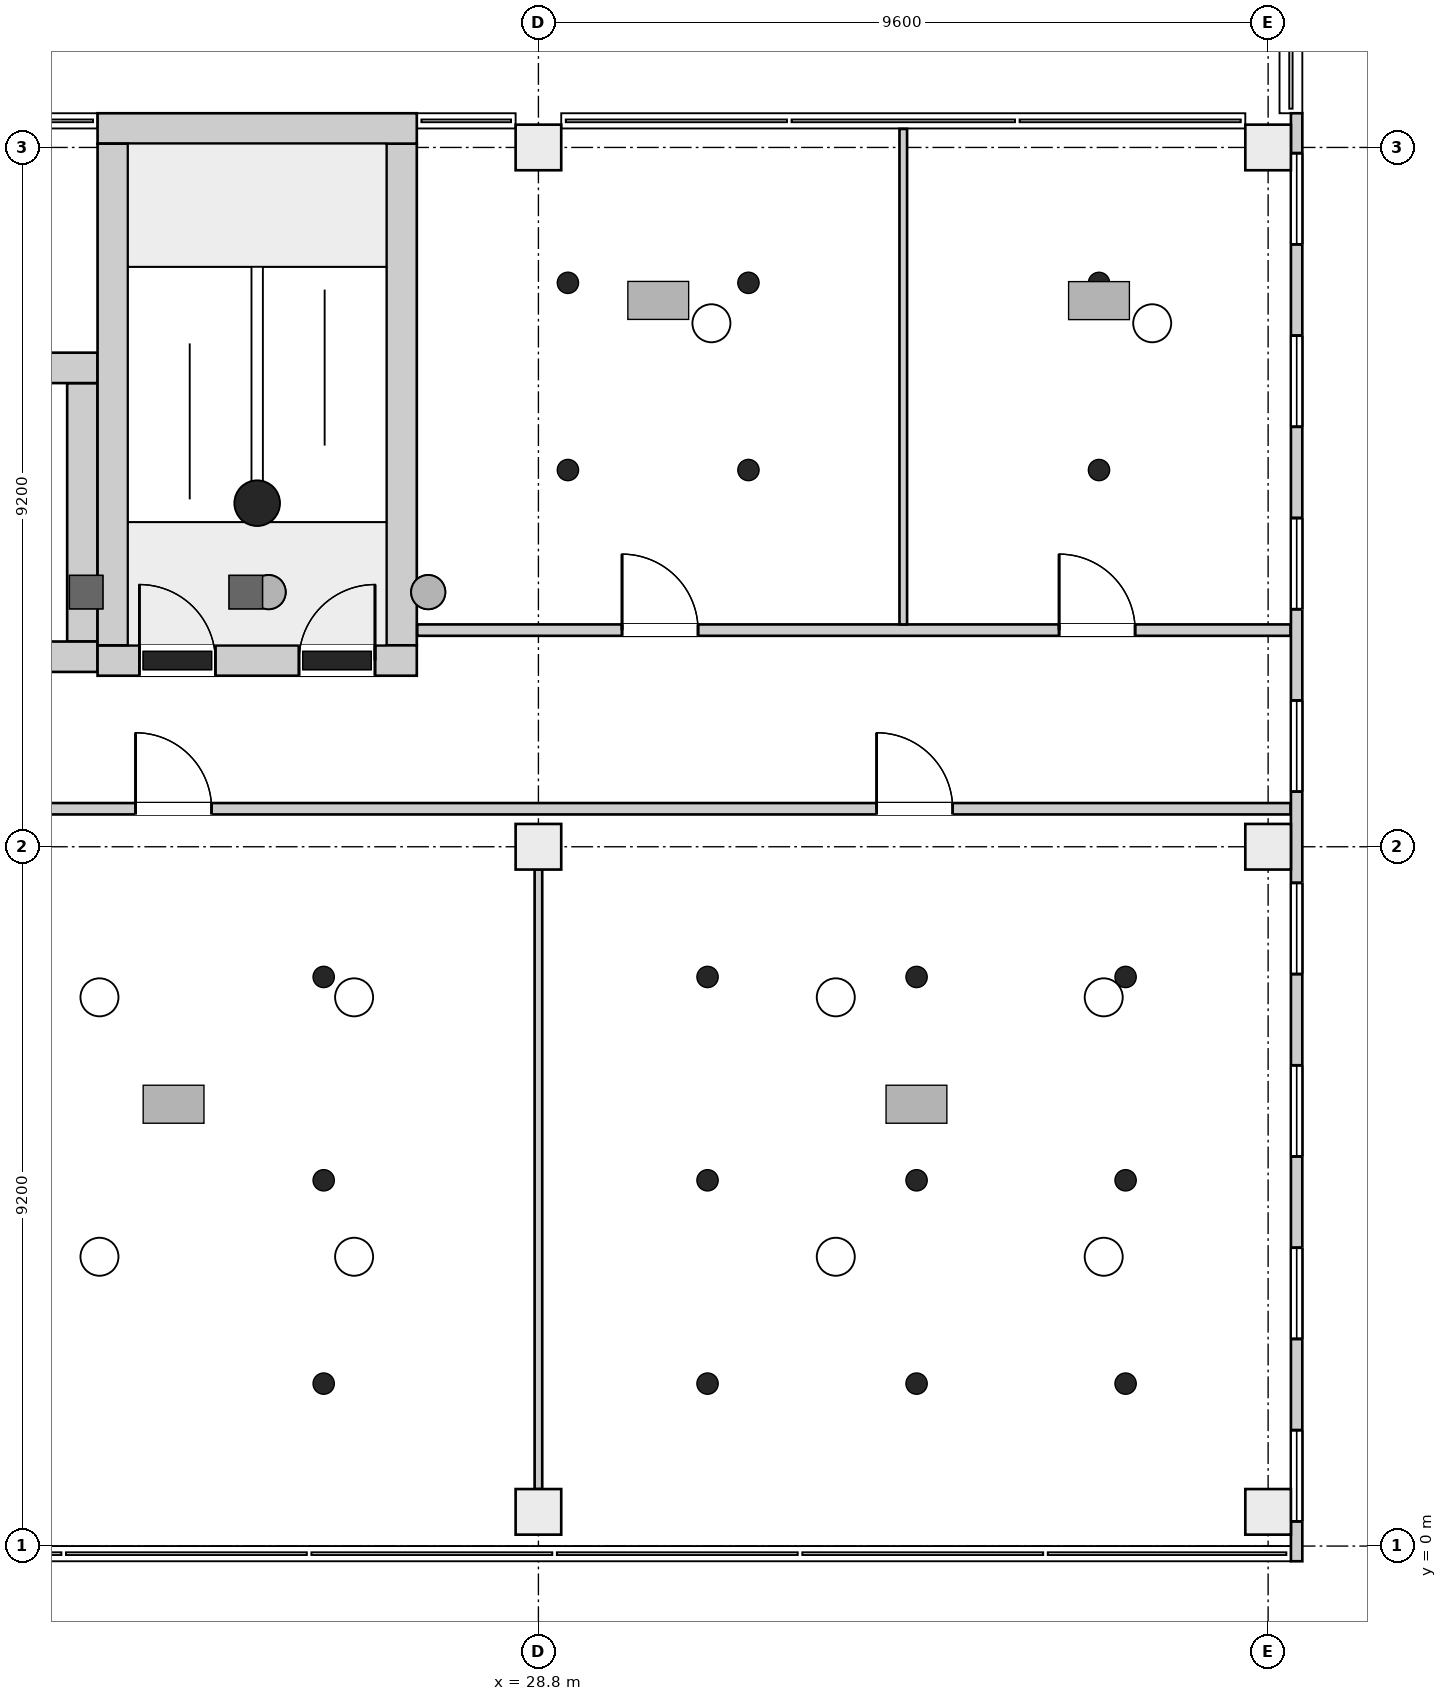
"""IFC4 building model, lengths in metres.
Left out: names, types, materials, properties, quantities, classifications, styles, units other than length and angle.
Written with IfcOpenShell. Run it as: python <this file> out.ifc"""

import sys

from ifc_helpers import new_model, si_unit, direction, frame, frame_2d, origin, origin_2d, place, context, subcontext, project, spatial, rectangle, extrude, element, fill, save


model = new_model("IFC4")
c1 = context("Model", 3, precision=1e-05, world=origin(), true_north=direction((0.0, 1.0)))
c2 = subcontext(c1, "Body", "Model", "MODEL_VIEW")
j1 = project(units=[si_unit("LENGTHUNIT", "METRE"), si_unit("PLANEANGLEUNIT", "RADIAN")], contexts=[c1])
p1 = place(None, origin())
s1 = spatial("IfcSite", under=j1, at=p1, CompositionType="ELEMENT")
p2 = place(p1, origin())
s2 = spatial("IfcBuilding", under=s1, at=p2, CompositionType="ELEMENT")
p3 = place(p2, frame((0.0, 0.0, 73.9)))
s3 = spatial("IfcBuildingStorey", under=s2, at=p3, CompositionType="ELEMENT", Elevation=73.9)
p4 = place(p3, frame((23.0, 11.65, 0.0), z_axis=(0.0, 0.0, 1.0), x_axis=(1.0, 0.0, 0.0)))
e1 = element("IfcWall", 1, at=p4, inside=s3, PredefinedType="SHEAR", context=c2, shape_type="SweptSolid", body=[
    extrude(rectangle(XDim=4.2, YDim=0.4, at=frame_2d((2.1, 0.0))), origin(), (0.0, 0.0, 1.0), 4.2),
])
p5 = place(p4, frame((0.55, 0.0, 0.0)))
e2 = element("IfcOpeningElement", 2, at=p5, cuts=e1, PredefinedType="OPENING", context=c2, shape_type="SweptSolid", body=[
    extrude(rectangle(XDim=1.0, YDim=2.1, at=frame_2d((0.5, 1.05))), frame((0.0, 0.21, 0.0), z_axis=(0.0, -1.0, 0.0), x_axis=(1.0, 0.0, 0.0)), (0.0, 0.0, 1.0), 0.42),
])
p6 = place(p4, frame((2.65, 0.0, 0.0)))
e3 = element("IfcOpeningElement", 3, at=p6, cuts=e1, PredefinedType="OPENING", context=c2, shape_type="SweptSolid", body=[
    extrude(rectangle(XDim=1.0, YDim=2.1, at=frame_2d((0.5, 1.05))), frame((0.0, 0.21, 0.0), z_axis=(0.0, -1.0, 0.0), x_axis=(1.0, 0.0, 0.0)), (0.0, 0.0, 1.0), 0.42),
])
p7 = place(p3, frame((23.0, 18.65, 0.0), z_axis=(0.0, 0.0, 1.0), x_axis=(1.0, 0.0, 0.0)))
e4 = element("IfcWall", 4, at=p7, inside=s3, PredefinedType="SHEAR", context=c2, shape_type="SweptSolid", body=[
    extrude(rectangle(XDim=4.2, YDim=0.4, at=frame_2d((2.1, 0.0))), origin(), (0.0, 0.0, 1.0), 4.2),
])
for number, where, z_axis, x_axis in (
    (5, (23.2, 11.85, 0.0), (0.0, 0.0, 1.0), (0.0, 1.0, 0.0)),
    (6, (27.0, 11.85, 0.0), (0.0, 0.0, 1.0), (0.0, 1.0, 0.0)),
):
    element("IfcWall", number, at=place(p3, frame(where, z_axis=z_axis, x_axis=x_axis)), inside=s3, PredefinedType="SHEAR", context=c2, shape_type="SweptSolid", body=[
        extrude(rectangle(XDim=6.6, YDim=0.4, at=frame_2d((3.3, 0.0))), origin(), (0.0, 0.0, 1.0), 4.2),
    ])
p8 = place(p3, frame((19.9, 11.7, 0.0), z_axis=(0.0, 0.0, 1.0), x_axis=(1.0, 0.0, 0.0)))
e7 = element("IfcWall", 7, at=p8, inside=s3, PredefinedType="SHEAR", context=c2, shape_type="SweptSolid", body=[
    extrude(rectangle(XDim=3.1, YDim=0.4, at=frame_2d((1.55, 0.0))), origin(), (0.0, 0.0, 1.0), 4.2),
])
p9 = place(p3, frame((19.9, 15.5, 0.0), z_axis=(0.0, 0.0, 1.0), x_axis=(1.0, 0.0, 0.0)))
e8 = element("IfcWall", 8, at=p9, inside=s3, PredefinedType="SHEAR", context=c2, shape_type="SweptSolid", body=[
    extrude(rectangle(XDim=3.1, YDim=0.4, at=frame_2d((1.55, 0.0))), origin(), (0.0, 0.0, 1.0), 4.2),
])
p10 = place(p9, frame((0.95, 0.0, 0.0)))
e9 = element("IfcOpeningElement", 9, at=p10, cuts=e8, PredefinedType="OPENING", context=c2, shape_type="SweptSolid", body=[
    extrude(rectangle(XDim=1.2, YDim=2.1, at=frame_2d((0.6, 1.05))), frame((0.0, 0.21, 0.0), z_axis=(0.0, -1.0, 0.0), x_axis=(1.0, 0.0, 0.0)), (0.0, 0.0, 1.0), 0.42),
])
p11 = place(p3, frame((22.8, 11.9, 0.0), z_axis=(0.0, 0.0, 1.0), x_axis=(0.0, 1.0, 0.0)))
e10 = element("IfcWall", 10, at=p11, inside=s3, PredefinedType="SHEAR", context=c2, shape_type="SweptSolid", body=[
    extrude(rectangle(XDim=3.4, YDim=0.4, at=frame_2d((1.7, 0.0))), origin(), (0.0, 0.0, 1.0), 4.2),
])
for number, where, z_axis, x_axis in (
    (11, (28.8, 0.45, 0.0), (0.0, 0.0, 1.0), (1.0, 0.0, 0.0)),
    (12, (38.4, 0.45, 0.0), (0.0, 0.0, 1.0), (1.0, 0.0, 0.0)),
    (13, (28.8, 9.2, 0.0), (0.0, 0.0, 1.0), (1.0, 0.0, 0.0)),
    (14, (38.4, 9.2, 0.0), (0.0, 0.0, 1.0), (1.0, 0.0, 0.0)),
    (15, (28.8, 18.4, 0.0), (0.0, 0.0, 1.0), (1.0, 0.0, 0.0)),
    (16, (38.4, 18.4, 0.0), (0.0, 0.0, 1.0), (1.0, 0.0, 0.0)),
):
    element("IfcColumn", number, at=place(p3, frame(where, z_axis=z_axis, x_axis=x_axis)), inside=s3, PredefinedType="COLUMN", context=c2, shape_type="SweptSolid", body=[
        extrude(rectangle(XDim=0.6, YDim=0.6, at=origin_2d()), origin(), (0.0, 0.0, 1.0), 4.2),
    ])
p12 = place(p3, frame((38.775, -0.2, 0.0), z_axis=(0.0, 0.0, 1.0), x_axis=(0.0, 1.0, 0.0)))
e17 = element("IfcWall", 17, at=p12, inside=s3, PredefinedType="ELEMENTEDWALL", context=c2, shape_type="SweptSolid", body=[
    extrude(rectangle(XDim=19.05, YDim=0.15, at=frame_2d((9.525, 0.0))), origin(), (0.0, 0.0, 1.0), 3.9),
])
p13 = place(p12, frame((0.525, 0.0, 0.9)))
e18 = element("IfcOpeningElement", 18, at=p13, cuts=e17, PredefinedType="OPENING", context=c2, shape_type="SweptSolid", body=[
    extrude(rectangle(XDim=1.2, YDim=2.6, at=frame_2d((0.6, 1.3))), frame((0.0, 0.085, 0.0), z_axis=(0.0, -1.0, 0.0), x_axis=(1.0, 0.0, 0.0)), (0.0, 0.0, 1.0), 0.17),
])
p14 = place(p12, frame((2.925, 0.0, 0.9)))
e19 = element("IfcOpeningElement", 19, at=p14, cuts=e17, PredefinedType="OPENING", context=c2, shape_type="SweptSolid", body=[
    extrude(rectangle(XDim=1.2, YDim=2.6, at=frame_2d((0.6, 1.3))), frame((0.0, 0.085, 0.0), z_axis=(0.0, -1.0, 0.0), x_axis=(1.0, 0.0, 0.0)), (0.0, 0.0, 1.0), 0.17),
])
p15 = place(p12, frame((5.325, 0.0, 0.9)))
e20 = element("IfcOpeningElement", 20, at=p15, cuts=e17, PredefinedType="OPENING", context=c2, shape_type="SweptSolid", body=[
    extrude(rectangle(XDim=1.2, YDim=2.6, at=frame_2d((0.6, 1.3))), frame((0.0, 0.085, 0.0), z_axis=(0.0, -1.0, 0.0), x_axis=(1.0, 0.0, 0.0)), (0.0, 0.0, 1.0), 0.17),
])
p16 = place(p12, frame((7.725, 0.0, 0.9)))
e21 = element("IfcOpeningElement", 21, at=p16, cuts=e17, PredefinedType="OPENING", context=c2, shape_type="SweptSolid", body=[
    extrude(rectangle(XDim=1.2, YDim=2.6, at=frame_2d((0.6, 1.3))), frame((0.0, 0.085, 0.0), z_axis=(0.0, -1.0, 0.0), x_axis=(1.0, 0.0, 0.0)), (0.0, 0.0, 1.0), 0.17),
])
p17 = place(p12, frame((10.125, 0.0, 0.9)))
e22 = element("IfcOpeningElement", 22, at=p17, cuts=e17, PredefinedType="OPENING", context=c2, shape_type="SweptSolid", body=[
    extrude(rectangle(XDim=1.2, YDim=2.6, at=frame_2d((0.6, 1.3))), frame((0.0, 0.085, 0.0), z_axis=(0.0, -1.0, 0.0), x_axis=(1.0, 0.0, 0.0)), (0.0, 0.0, 1.0), 0.17),
])
p18 = place(p12, frame((12.525, 0.0, 0.9)))
e23 = element("IfcOpeningElement", 23, at=p18, cuts=e17, PredefinedType="OPENING", context=c2, shape_type="SweptSolid", body=[
    extrude(rectangle(XDim=1.2, YDim=2.6, at=frame_2d((0.6, 1.3))), frame((0.0, 0.085, 0.0), z_axis=(0.0, -1.0, 0.0), x_axis=(1.0, 0.0, 0.0)), (0.0, 0.0, 1.0), 0.17),
])
p19 = place(p12, frame((14.925, 0.0, 0.9)))
e24 = element("IfcOpeningElement", 24, at=p19, cuts=e17, PredefinedType="OPENING", context=c2, shape_type="SweptSolid", body=[
    extrude(rectangle(XDim=1.2, YDim=2.6, at=frame_2d((0.6, 1.3))), frame((0.0, 0.085, 0.0), z_axis=(0.0, -1.0, 0.0), x_axis=(1.0, 0.0, 0.0)), (0.0, 0.0, 1.0), 0.17),
])
p20 = place(p12, frame((17.325, 0.0, 0.9)))
e25 = element("IfcOpeningElement", 25, at=p20, cuts=e17, PredefinedType="OPENING", context=c2, shape_type="SweptSolid", body=[
    extrude(rectangle(XDim=1.2, YDim=2.6, at=frame_2d((0.6, 1.3))), frame((0.0, 0.085, 0.0), z_axis=(0.0, -1.0, 0.0), x_axis=(1.0, 0.0, 0.0)), (0.0, 0.0, 1.0), 0.17),
])
p21 = place(p3, frame((4.325, 9.7, 0.0), z_axis=(0.0, 0.0, 1.0), x_axis=(1.0, 0.0, 0.0)))
e26 = element("IfcWall", 26, at=p21, inside=s3, PredefinedType="PARTITIONING", context=c2, shape_type="SweptSolid", body=[
    extrude(rectangle(XDim=34.369, YDim=0.15, at=frame_2d((17.185, 0.0))), origin(), (0.0, 0.0, 1.0), 3.9),
])
p22 = place(p21, frame((3.975, 0.0, 0.0)))
e27 = element("IfcOpeningElement", 27, at=p22, cuts=e26, PredefinedType="OPENING", context=c2, shape_type="SweptSolid", body=[
    extrude(rectangle(XDim=1.0, YDim=2.1, at=frame_2d((0.5, 1.05))), frame((0.0, 0.085, 0.0), z_axis=(0.0, -1.0, 0.0), x_axis=(1.0, 0.0, 0.0)), (0.0, 0.0, 1.0), 0.17),
])
p23 = place(p21, frame((11.975, 0.0, 0.0)))
e28 = element("IfcOpeningElement", 28, at=p23, cuts=e26, PredefinedType="OPENING", context=c2, shape_type="SweptSolid", body=[
    extrude(rectangle(XDim=1.0, YDim=2.1, at=frame_2d((0.5, 1.05))), frame((0.0, 0.085, 0.0), z_axis=(0.0, -1.0, 0.0), x_axis=(1.0, 0.0, 0.0)), (0.0, 0.0, 1.0), 0.17),
])
p24 = place(p21, frame((19.175, 0.0, 0.0)))
e29 = element("IfcOpeningElement", 29, at=p24, cuts=e26, PredefinedType="OPENING", context=c2, shape_type="SweptSolid", body=[
    extrude(rectangle(XDim=1.0, YDim=2.1, at=frame_2d((0.5, 1.05))), frame((0.0, 0.085, 0.0), z_axis=(0.0, -1.0, 0.0), x_axis=(1.0, 0.0, 0.0)), (0.0, 0.0, 1.0), 0.17),
])
p25 = place(p21, frame((28.925, 0.0, 0.0)))
e30 = element("IfcOpeningElement", 30, at=p25, cuts=e26, PredefinedType="OPENING", context=c2, shape_type="SweptSolid", body=[
    extrude(rectangle(XDim=1.0, YDim=2.1, at=frame_2d((0.5, 1.05))), frame((0.0, 0.085, 0.0), z_axis=(0.0, -1.0, 0.0), x_axis=(1.0, 0.0, 0.0)), (0.0, 0.0, 1.0), 0.17),
])
p26 = place(p3, frame((27.206, 12.05, 0.0), z_axis=(0.0, 0.0, 1.0), x_axis=(1.0, 0.0, 0.0)))
e31 = element("IfcWall", 31, at=p26, inside=s3, PredefinedType="PARTITIONING", context=c2, shape_type="SweptSolid", body=[
    extrude(rectangle(XDim=11.488, YDim=0.15, at=frame_2d((5.744, 0.0))), origin(), (0.0, 0.0, 1.0), 3.9),
])
p27 = place(p26, frame((2.694, 0.0, 0.0)))
e32 = element("IfcOpeningElement", 32, at=p27, cuts=e31, PredefinedType="OPENING", context=c2, shape_type="SweptSolid", body=[
    extrude(rectangle(XDim=1.0, YDim=2.1, at=frame_2d((0.5, 1.05))), frame((0.0, 0.085, 0.0), z_axis=(0.0, -1.0, 0.0), x_axis=(1.0, 0.0, 0.0)), (0.0, 0.0, 1.0), 0.17),
])
p28 = place(p26, frame((8.444, 0.0, 0.0)))
e33 = element("IfcOpeningElement", 33, at=p28, cuts=e31, PredefinedType="OPENING", context=c2, shape_type="SweptSolid", body=[
    extrude(rectangle(XDim=1.0, YDim=2.1, at=frame_2d((0.5, 1.05))), frame((0.0, 0.085, 0.0), z_axis=(0.0, -1.0, 0.0), x_axis=(1.0, 0.0, 0.0)), (0.0, 0.0, 1.0), 0.17),
])
p29 = place(p3, frame((28.8, 0.75, 0.0), z_axis=(0.0, 0.0, 1.0), x_axis=(0.0, 1.0, 0.0)))
e34 = element("IfcWall", 34, at=p29, inside=s3, PredefinedType="PARTITIONING", context=c2, shape_type="SweptSolid", body=[
    extrude(rectangle(XDim=8.15, YDim=0.1, at=frame_2d((4.075, 0.0))), origin(), (0.0, 0.0, 1.0), 3.9),
])
p30 = place(p3, frame((33.6, 12.125, 0.0), z_axis=(0.0, 0.0, 1.0), x_axis=(0.0, 1.0, 0.0)))
e35 = element("IfcWall", 35, at=p30, inside=s3, PredefinedType="PARTITIONING", context=c2, shape_type="SweptSolid", body=[
    extrude(rectangle(XDim=6.519, YDim=0.1, at=frame_2d((3.26, 0.0))), origin(), (0.0, 0.0, 1.0), 3.9),
])
p31 = place(p13, origin())
e36 = element("IfcWindow", 36, at=p31, inside=s3, PartitioningType="SINGLE_PANEL", PredefinedType="WINDOW", context=c2, shape_type="SweptSolid", body=[
    extrude(rectangle(XDim=1.2, YDim=2.6, at=frame_2d((0.6, 1.3))), frame((0.0, 0.03, 0.0), z_axis=(0.0, -1.0, 0.0), x_axis=(1.0, 0.0, 0.0)), (0.0, 0.0, 1.0), 0.06),
])
fill(e18, e36)
p32 = place(p14, origin())
e37 = element("IfcWindow", 37, at=p32, inside=s3, PartitioningType="SINGLE_PANEL", PredefinedType="WINDOW", context=c2, shape_type="SweptSolid", body=[
    extrude(rectangle(XDim=1.2, YDim=2.6, at=frame_2d((0.6, 1.3))), frame((0.0, 0.03, 0.0), z_axis=(0.0, -1.0, 0.0), x_axis=(1.0, 0.0, 0.0)), (0.0, 0.0, 1.0), 0.06),
])
fill(e19, e37)
p33 = place(p15, origin())
e38 = element("IfcWindow", 38, at=p33, inside=s3, PartitioningType="SINGLE_PANEL", PredefinedType="WINDOW", context=c2, shape_type="SweptSolid", body=[
    extrude(rectangle(XDim=1.2, YDim=2.6, at=frame_2d((0.6, 1.3))), frame((0.0, 0.03, 0.0), z_axis=(0.0, -1.0, 0.0), x_axis=(1.0, 0.0, 0.0)), (0.0, 0.0, 1.0), 0.06),
])
fill(e20, e38)
p34 = place(p16, origin())
e39 = element("IfcWindow", 39, at=p34, inside=s3, PartitioningType="SINGLE_PANEL", PredefinedType="WINDOW", context=c2, shape_type="SweptSolid", body=[
    extrude(rectangle(XDim=1.2, YDim=2.6, at=frame_2d((0.6, 1.3))), frame((0.0, 0.03, 0.0), z_axis=(0.0, -1.0, 0.0), x_axis=(1.0, 0.0, 0.0)), (0.0, 0.0, 1.0), 0.06),
])
fill(e21, e39)
p35 = place(p17, origin())
e40 = element("IfcWindow", 40, at=p35, inside=s3, PartitioningType="SINGLE_PANEL", PredefinedType="WINDOW", context=c2, shape_type="SweptSolid", body=[
    extrude(rectangle(XDim=1.2, YDim=2.6, at=frame_2d((0.6, 1.3))), frame((0.0, 0.03, 0.0), z_axis=(0.0, -1.0, 0.0), x_axis=(1.0, 0.0, 0.0)), (0.0, 0.0, 1.0), 0.06),
])
fill(e22, e40)
p36 = place(p18, origin())
e41 = element("IfcWindow", 41, at=p36, inside=s3, PartitioningType="SINGLE_PANEL", PredefinedType="WINDOW", context=c2, shape_type="SweptSolid", body=[
    extrude(rectangle(XDim=1.2, YDim=2.6, at=frame_2d((0.6, 1.3))), frame((0.0, 0.03, 0.0), z_axis=(0.0, -1.0, 0.0), x_axis=(1.0, 0.0, 0.0)), (0.0, 0.0, 1.0), 0.06),
])
fill(e23, e41)
p37 = place(p19, origin())
e42 = element("IfcWindow", 42, at=p37, inside=s3, PartitioningType="SINGLE_PANEL", PredefinedType="WINDOW", context=c2, shape_type="SweptSolid", body=[
    extrude(rectangle(XDim=1.2, YDim=2.6, at=frame_2d((0.6, 1.3))), frame((0.0, 0.03, 0.0), z_axis=(0.0, -1.0, 0.0), x_axis=(1.0, 0.0, 0.0)), (0.0, 0.0, 1.0), 0.06),
])
fill(e24, e42)
p38 = place(p20, origin())
e43 = element("IfcWindow", 43, at=p38, inside=s3, PartitioningType="SINGLE_PANEL", PredefinedType="WINDOW", context=c2, shape_type="SweptSolid", body=[
    extrude(rectangle(XDim=1.2, YDim=2.6, at=frame_2d((0.6, 1.3))), frame((0.0, 0.03, 0.0), z_axis=(0.0, -1.0, 0.0), x_axis=(1.0, 0.0, 0.0)), (0.0, 0.0, 1.0), 0.06),
])
fill(e25, e43)
p39 = place(p5, origin())
e44 = element("IfcDoor", 44, at=p39, inside=s3, OperationType="SINGLE_SWING_RIGHT", PredefinedType="DOOR", context=c2, shape_type="SweptSolid", body=[
    extrude(rectangle(XDim=1.0, YDim=2.1, at=frame_2d((0.5, 1.05))), frame((0.0, 0.025, 0.0), z_axis=(0.0, -1.0, 0.0), x_axis=(1.0, 0.0, 0.0)), (0.0, 0.0, 1.0), 0.05),
])
fill(e2, e44)
p40 = place(p6, origin())
e45 = element("IfcDoor", 45, at=p40, inside=s3, OperationType="SINGLE_SWING_LEFT", PredefinedType="DOOR", context=c2, shape_type="SweptSolid", body=[
    extrude(rectangle(XDim=1.0, YDim=2.1, at=frame_2d((0.5, 1.05))), frame((0.0, 0.025, 0.0), z_axis=(0.0, -1.0, 0.0), x_axis=(1.0, 0.0, 0.0)), (0.0, 0.0, 1.0), 0.05),
])
fill(e3, e45)
p41 = place(p24, origin())
e46 = element("IfcDoor", 46, at=p41, inside=s3, OperationType="SINGLE_SWING_LEFT", PredefinedType="DOOR", context=c2, shape_type="SweptSolid", body=[
    extrude(rectangle(XDim=1.0, YDim=2.1, at=frame_2d((0.5, 1.05))), frame((0.0, 0.025, 0.0), z_axis=(0.0, -1.0, 0.0), x_axis=(1.0, 0.0, 0.0)), (0.0, 0.0, 1.0), 0.05),
])
fill(e29, e46)
p42 = place(p25, origin())
e47 = element("IfcDoor", 47, at=p42, inside=s3, OperationType="SINGLE_SWING_LEFT", PredefinedType="DOOR", context=c2, shape_type="SweptSolid", body=[
    extrude(rectangle(XDim=1.0, YDim=2.1, at=frame_2d((0.5, 1.05))), frame((0.0, 0.025, 0.0), z_axis=(0.0, -1.0, 0.0), x_axis=(1.0, 0.0, 0.0)), (0.0, 0.0, 1.0), 0.05),
])
fill(e30, e47)
p43 = place(p27, origin())
e48 = element("IfcDoor", 48, at=p43, inside=s3, OperationType="SINGLE_SWING_LEFT", PredefinedType="DOOR", context=c2, shape_type="SweptSolid", body=[
    extrude(rectangle(XDim=1.0, YDim=2.1, at=frame_2d((0.5, 1.05))), frame((0.0, 0.025, 0.0), z_axis=(0.0, -1.0, 0.0), x_axis=(1.0, 0.0, 0.0)), (0.0, 0.0, 1.0), 0.05),
])
fill(e32, e48)
p44 = place(p28, origin())
e49 = element("IfcDoor", 49, at=p44, inside=s3, OperationType="SINGLE_SWING_RIGHT", PredefinedType="DOOR", context=c2, shape_type="SweptSolid", body=[
    extrude(rectangle(XDim=1.0, YDim=2.1, at=frame_2d((0.5, 1.05))), frame((0.0, 0.025, 0.0), z_axis=(0.0, -1.0, 0.0), x_axis=(1.0, 0.0, 0.0)), (0.0, 0.0, 1.0), 0.05),
])
fill(e33, e49)
save(model, sys.argv[1])
